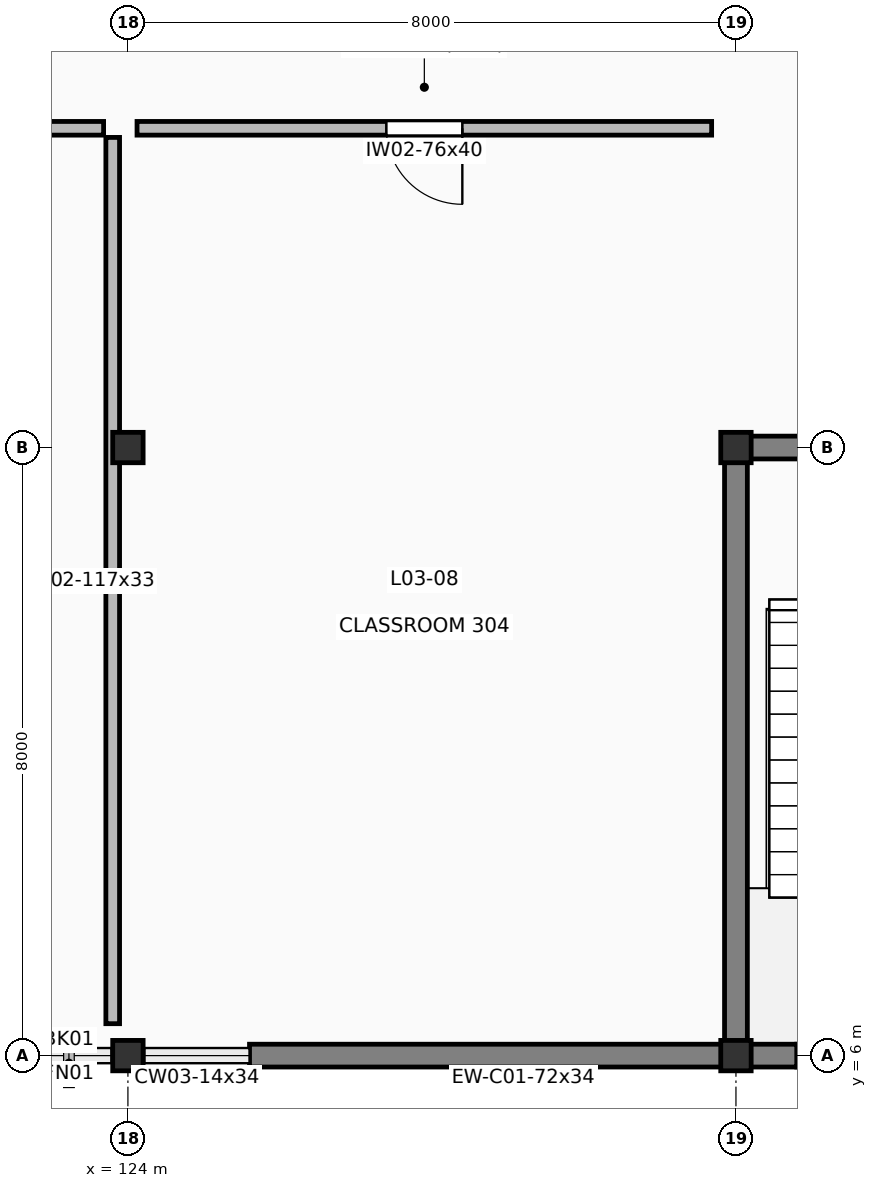
"""IFC4 building model, lengths in metres.
Left out: names, types, materials, properties, quantities, classifications, styles, units other than length and angle.
Written with IfcOpenShell. Run it as: python <this file> out.ifc"""

import sys

from ifc_helpers import new_model, si_unit, direction, frame, frame_2d, origin, origin_2d, place, context, subcontext, project, spatial, rectangle, extrude, element, fill, save


model = new_model("IFC4")
c1 = context("Model", 3, precision=1e-05, world=origin(), true_north=direction((0.0, 1.0)))
c2 = subcontext(c1, "Body", "Model", "MODEL_VIEW")
j1 = project(units=[si_unit("LENGTHUNIT", "METRE"), si_unit("PLANEANGLEUNIT", "RADIAN")], contexts=[c1])
p1 = place(None, origin())
s1 = spatial("IfcSite", under=j1, at=p1, CompositionType="ELEMENT")
p2 = place(p1, origin())
s2 = spatial("IfcBuilding", under=s1, at=p2, CompositionType="ELEMENT")
p3 = place(p2, frame((0.0, 0.0, 13.8)))
s3 = spatial("IfcBuildingStorey", under=s2, at=p3, CompositionType="ELEMENT", Elevation=13.8)
for number, where, z_axis, x_axis in (
    (1, (124.0, 6.0, 0.0), (0.0, 0.0, 1.0), (1.0, 0.0, 0.0)),
    (2, (124.0, 14.0, 0.0), (0.0, 0.0, 1.0), (1.0, 0.0, 0.0)),
    (3, (132.0, 6.0, 0.0), (0.0, 0.0, 1.0), (1.0, 0.0, 0.0)),
    (4, (132.0, 14.0, 0.0), (0.0, 0.0, 1.0), (1.0, 0.0, 0.0)),
):
    element("IfcColumn", number, at=place(p3, frame(where, z_axis=z_axis, x_axis=x_axis)), inside=s3, PredefinedType="COLUMN", context=c2, shape_type="SweptSolid", body=[
        extrude(rectangle(XDim=0.4, YDim=0.4, at=origin_2d()), origin(), (0.0, 0.0, 1.0), 4.2),
    ])
for number, where, z_axis, x_axis in (
    (5, (140.0, 6.0, 0.0), (0.0, 0.0, 1.0), (-1.0, 0.0, 0.0)),
    (6, (132.8, 6.0, 0.0), (0.0, 0.0, 1.0), (-1.0, 0.0, 0.0)),
):
    element("IfcWall", number, at=place(p3, frame(where, z_axis=z_axis, x_axis=x_axis)), inside=s3, PredefinedType="SOLIDWALL", context=c2, shape_type="SweptSolid", body=[
        extrude(rectangle(XDim=7.2, YDim=0.3, at=frame_2d((3.6, 0.0))), origin(), (0.0, 0.0, 1.0), 4.2),
    ])
p4 = place(p3, frame((132.0, 6.0, 0.0), z_axis=(0.0, 0.0, 1.0), x_axis=(0.0, 1.0, 0.0)))
e7 = element("IfcWall", 7, at=p4, inside=s3, PredefinedType="SHEAR", context=c2, shape_type="SweptSolid", body=[
    extrude(rectangle(XDim=8.0, YDim=0.3, at=frame_2d((4.0, 0.0))), origin(), (0.0, 0.0, 1.0), 4.2),
])
p5 = place(p3, frame((132.0, 14.0, 0.0), z_axis=(0.0, 0.0, 1.0), x_axis=(1.0, 0.0, 0.0)))
e8 = element("IfcWall", 8, at=p5, inside=s3, PredefinedType="SHEAR", context=c2, shape_type="SweptSolid", body=[
    extrude(rectangle(XDim=8.0, YDim=0.3, at=frame_2d((4.0, 0.0))), origin(), (0.0, 0.0, 1.0), 4.2),
])
p6 = place(p5, frame((1.65, 0.0, 0.0)))
e9 = element("IfcOpeningElement", 9, at=p6, cuts=e8, PredefinedType="OPENING", context=c2, shape_type="SweptSolid", body=[
    extrude(rectangle(XDim=1.1, YDim=2.2, at=frame_2d((0.55, 1.1))), frame((0.0, 0.16, 0.0), z_axis=(0.0, -1.0, 0.0), x_axis=(1.0, 0.0, 0.0)), (0.0, 0.0, 1.0), 0.32),
])
p7 = place(p3, frame((123.68, 18.2, 0.0), z_axis=(0.0, 0.0, 1.0), x_axis=(-1.0, 0.0, 0.0)))
e10 = element("IfcWall", 10, at=p7, inside=s3, PredefinedType="PARTITIONING", context=c2, shape_type="SweptSolid", body=[
    extrude(rectangle(XDim=15.36, YDim=0.18, at=frame_2d((7.68, 0.0))), origin(), (0.0, 0.0, 1.0), 3.98),
])
p8 = place(p7, frame((7.18, 0.0, 0.0)))
e11 = element("IfcOpeningElement", 11, at=p8, cuts=e10, PredefinedType="OPENING", context=c2, shape_type="SweptSolid", body=[
    extrude(rectangle(XDim=1.0, YDim=2.15, at=frame_2d((0.5, 1.075))), frame((0.0, 0.1, 0.0), z_axis=(0.0, -1.0, 0.0), x_axis=(1.0, 0.0, 0.0)), (0.0, 0.0, 1.0), 0.2),
])
p9 = place(p3, frame((123.8, 6.42, 0.0), z_axis=(0.0, 0.0, 1.0), x_axis=(0.0, 1.0, 0.0)))
e12 = element("IfcWall", 12, at=p9, inside=s3, PredefinedType="PARTITIONING", context=c2, shape_type="SweptSolid", body=[
    extrude(rectangle(XDim=11.66, YDim=0.18, at=frame_2d((5.83, 0.0))), origin(), (0.0, 0.0, 1.0), 3.325),
])
p10 = place(p3, frame((131.68, 18.2, 0.0), z_axis=(0.0, 0.0, 1.0), x_axis=(-1.0, 0.0, 0.0)))
e13 = element("IfcWall", 13, at=p10, inside=s3, PredefinedType="PARTITIONING", context=c2, shape_type="SweptSolid", body=[
    extrude(rectangle(XDim=7.56, YDim=0.18, at=frame_2d((3.78, 0.0))), origin(), (0.0, 0.0, 1.0), 3.98),
])
p11 = place(p10, frame((3.28, 0.0, 0.0)))
e14 = element("IfcOpeningElement", 14, at=p11, cuts=e13, PredefinedType="OPENING", context=c2, shape_type="SweptSolid", body=[
    extrude(rectangle(XDim=1.0, YDim=2.15, at=frame_2d((0.5, 1.075))), frame((0.0, 0.1, 0.0), z_axis=(0.0, -1.0, 0.0), x_axis=(1.0, 0.0, 0.0)), (0.0, 0.0, 1.0), 0.2),
])
p12 = place(p11, origin())
e15 = element("IfcDoor", 15, at=p12, inside=s3, OperationType="SINGLE_SWING_LEFT", PredefinedType="DOOR", context=c2, shape_type="SweptSolid", body=[
    extrude(rectangle(XDim=1.0, YDim=2.15, at=frame_2d((0.5, 1.075))), frame((0.0, 0.025, 0.0), z_axis=(0.0, -1.0, 0.0), x_axis=(1.0, 0.0, 0.0)), (0.0, 0.0, 1.0), 0.05),
])
fill(e14, e15)
save(model, sys.argv[1])
